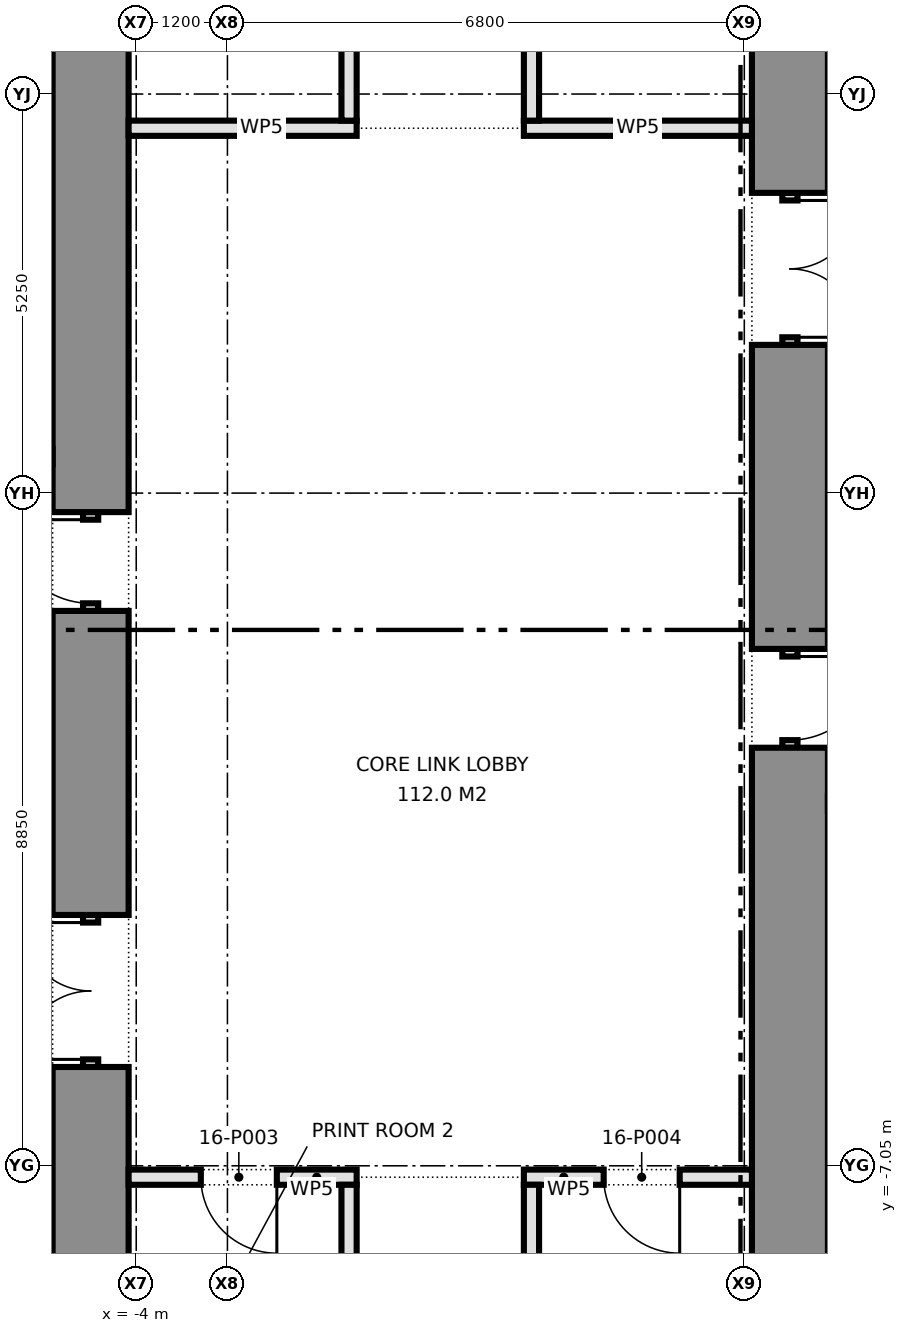
"""IFC4 building model, lengths in metres.
Left out: names, types, materials, properties, quantities, classifications, styles, units other than length and angle.
Written with IfcOpenShell. Run it as: python <this file> out.ifc"""

import sys

from ifc_helpers import new_model, si_unit, direction, frame, frame_2d, origin, place, context, subcontext, project, spatial, rectangle, extrude, element, fill, save


model = new_model("IFC4")
c1 = context("Model", 3, precision=1e-05, world=origin(), true_north=direction((0.0, 1.0)))
c2 = subcontext(c1, "Body", "Model", "MODEL_VIEW")
j1 = project(units=[si_unit("LENGTHUNIT", "METRE"), si_unit("PLANEANGLEUNIT", "RADIAN")], contexts=[c1])
p1 = place(None, origin())
s1 = spatial("IfcSite", under=j1, at=p1, CompositionType="ELEMENT")
p2 = place(p1, origin())
s2 = spatial("IfcBuilding", under=s1, at=p2, CompositionType="ELEMENT")
p3 = place(p2, frame((0.0, 0.0, 73.2)))
s3 = spatial("IfcBuildingStorey", under=s2, at=p3, CompositionType="ELEMENT", Elevation=73.2)
p4 = place(p3, frame((-4.6, -8.9, 0.0), z_axis=(0.0, 0.0, 1.0), x_axis=(0.0, 1.0, 0.0)))
e1 = element("IfcWall", 1, at=p4, inside=s3, PredefinedType="SHEAR", context=c2, shape_type="SweptSolid", body=[
    extrude(rectangle(XDim=3.15, YDim=1.0, at=frame_2d((1.575, 0.0))), origin(), (0.0, 0.0, 1.0), 4.2),
])
p5 = place(p3, frame((-4.6, -5.75, 0.0), z_axis=(0.0, 0.0, 1.0), x_axis=(0.0, 1.0, 0.0)))
e2 = element("IfcWall", 2, at=p5, inside=s3, PredefinedType="PARTITIONING", context=c2, shape_type="SweptSolid", body=[
    extrude(rectangle(XDim=2.0, YDim=0.2, at=frame_2d((1.0, 0.0))), origin(), (0.0, 0.0, 1.0), 2.4),
])
p6 = place(p5, frame((0.1, 0.0, 0.0)))
e3 = element("IfcOpeningElement", 3, at=p6, cuts=e2, PredefinedType="OPENING", context=c2, shape_type="SweptSolid", body=[
    extrude(rectangle(XDim=1.8, YDim=2.1, at=frame_2d((0.9, 1.05))), frame((0.0, 0.11, 0.0), z_axis=(0.0, -1.0, 0.0), x_axis=(1.0, 0.0, 0.0)), (0.0, 0.0, 1.0), 0.22),
])
p7 = place(p3, frame((-4.6, -3.75, 0.0), z_axis=(0.0, 0.0, 1.0), x_axis=(0.0, 1.0, 0.0)))
e4 = element("IfcWall", 4, at=p7, inside=s3, PredefinedType="SHEAR", context=c2, shape_type="SweptSolid", body=[
    extrude(rectangle(XDim=4.0, YDim=1.0, at=frame_2d((2.0, 0.0))), origin(), (0.0, 0.0, 1.0), 4.2),
])
p8 = place(p3, frame((-4.6, 0.25, 0.0), z_axis=(0.0, 0.0, 1.0), x_axis=(0.0, 1.0, 0.0)))
e5 = element("IfcWall", 5, at=p8, inside=s3, PredefinedType="PARTITIONING", context=c2, shape_type="SweptSolid", body=[
    extrude(rectangle(XDim=1.3, YDim=0.2, at=frame_2d((0.65, 0.0))), origin(), (0.0, 0.0, 1.0), 2.4),
])
p9 = place(p8, frame((0.1, 0.0, 0.0)))
e6 = element("IfcOpeningElement", 6, at=p9, cuts=e5, PredefinedType="OPENING", context=c2, shape_type="SweptSolid", body=[
    extrude(rectangle(XDim=1.1, YDim=2.1, at=frame_2d((0.55, 1.05))), frame((0.0, 0.11, 0.0), z_axis=(0.0, -1.0, 0.0), x_axis=(1.0, 0.0, 0.0)), (0.0, 0.0, 1.0), 0.22),
])
p10 = place(p3, frame((-4.6, 1.55, 0.0), z_axis=(0.0, 0.0, 1.0), x_axis=(0.0, 1.0, 0.0)))
e7 = element("IfcWall", 7, at=p10, inside=s3, PredefinedType="SHEAR", context=c2, shape_type="SweptSolid", body=[
    extrude(rectangle(XDim=7.35, YDim=1.0, at=frame_2d((3.675, 0.0))), origin(), (0.0, 0.0, 1.0), 4.2),
])
p11 = place(p3, frame((4.6, 8.9, 0.0), z_axis=(0.0, 0.0, 1.0), x_axis=(0.0, -1.0, 0.0)))
e8 = element("IfcWall", 8, at=p11, inside=s3, PredefinedType="SHEAR", context=c2, shape_type="SweptSolid", body=[
    extrude(rectangle(XDim=3.15, YDim=1.0, at=frame_2d((1.575, 0.0))), origin(), (0.0, 0.0, 1.0), 4.2),
])
p12 = place(p3, frame((4.6, 5.75, 0.0), z_axis=(0.0, 0.0, 1.0), x_axis=(0.0, -1.0, 0.0)))
e9 = element("IfcWall", 9, at=p12, inside=s3, PredefinedType="PARTITIONING", context=c2, shape_type="SweptSolid", body=[
    extrude(rectangle(XDim=2.0, YDim=0.2, at=frame_2d((1.0, 0.0))), origin(), (0.0, 0.0, 1.0), 2.4),
])
p13 = place(p12, frame((0.1, 0.0, 0.0)))
e10 = element("IfcOpeningElement", 10, at=p13, cuts=e9, PredefinedType="OPENING", context=c2, shape_type="SweptSolid", body=[
    extrude(rectangle(XDim=1.8, YDim=2.1, at=frame_2d((0.9, 1.05))), frame((0.0, 0.11, 0.0), z_axis=(0.0, -1.0, 0.0), x_axis=(1.0, 0.0, 0.0)), (0.0, 0.0, 1.0), 0.22),
])
p14 = place(p3, frame((4.6, 3.75, 0.0), z_axis=(0.0, 0.0, 1.0), x_axis=(0.0, -1.0, 0.0)))
e11 = element("IfcWall", 11, at=p14, inside=s3, PredefinedType="SHEAR", context=c2, shape_type="SweptSolid", body=[
    extrude(rectangle(XDim=4.0, YDim=1.0, at=frame_2d((2.0, 0.0))), origin(), (0.0, 0.0, 1.0), 4.2),
])
p15 = place(p3, frame((4.6, -0.25, 0.0), z_axis=(0.0, 0.0, 1.0), x_axis=(0.0, -1.0, 0.0)))
e12 = element("IfcWall", 12, at=p15, inside=s3, PredefinedType="PARTITIONING", context=c2, shape_type="SweptSolid", body=[
    extrude(rectangle(XDim=1.3, YDim=0.2, at=frame_2d((0.65, 0.0))), origin(), (0.0, 0.0, 1.0), 2.4),
])
p16 = place(p15, frame((0.1, 0.0, 0.0)))
e13 = element("IfcOpeningElement", 13, at=p16, cuts=e12, PredefinedType="OPENING", context=c2, shape_type="SweptSolid", body=[
    extrude(rectangle(XDim=1.1, YDim=2.1, at=frame_2d((0.55, 1.05))), frame((0.0, 0.11, 0.0), z_axis=(0.0, -1.0, 0.0), x_axis=(1.0, 0.0, 0.0)), (0.0, 0.0, 1.0), 0.22),
])
p17 = place(p3, frame((4.6, -1.55, 0.0), z_axis=(0.0, 0.0, 1.0), x_axis=(0.0, -1.0, 0.0)))
e14 = element("IfcWall", 14, at=p17, inside=s3, PredefinedType="SHEAR", context=c2, shape_type="SweptSolid", body=[
    extrude(rectangle(XDim=7.35, YDim=1.0, at=frame_2d((3.675, 0.0))), origin(), (0.0, 0.0, 1.0), 4.2),
])
p18 = place(p3, frame((-4.1, -7.2, 0.0), z_axis=(0.0, 0.0, 1.0), x_axis=(1.0, 0.0, 0.0)))
e15 = element("IfcWall", 15, at=p18, inside=s3, PredefinedType="PARTITIONING", context=c2, shape_type="SweptSolid", body=[
    extrude(rectangle(XDim=3.0, YDim=0.2, at=frame_2d((1.5, 0.0))), origin(), (0.0, 0.0, 1.0), 4.2),
])
p19 = place(p18, frame((0.95, 0.0, 0.0)))
e16 = element("IfcOpeningElement", 16, at=p19, cuts=e15, PredefinedType="OPENING", context=c2, shape_type="SweptSolid", body=[
    extrude(rectangle(XDim=1.0, YDim=2.1, at=frame_2d((0.5, 1.05))), frame((0.0, 0.11, 0.0), z_axis=(0.0, -1.0, 0.0), x_axis=(1.0, 0.0, 0.0)), (0.0, 0.0, 1.0), 0.22),
])
p20 = place(p3, frame((1.1, -7.2, 0.0), z_axis=(0.0, 0.0, 1.0), x_axis=(1.0, 0.0, 0.0)))
e17 = element("IfcWall", 17, at=p20, inside=s3, PredefinedType="PARTITIONING", context=c2, shape_type="SweptSolid", body=[
    extrude(rectangle(XDim=3.0, YDim=0.2, at=frame_2d((1.5, 0.0))), origin(), (0.0, 0.0, 1.0), 4.2),
])
p21 = place(p20, frame((1.05, 0.0, 0.0)))
e18 = element("IfcOpeningElement", 18, at=p21, cuts=e17, PredefinedType="OPENING", context=c2, shape_type="SweptSolid", body=[
    extrude(rectangle(XDim=1.0, YDim=2.1, at=frame_2d((0.5, 1.05))), frame((0.0, 0.11, 0.0), z_axis=(0.0, -1.0, 0.0), x_axis=(1.0, 0.0, 0.0)), (0.0, 0.0, 1.0), 0.22),
])
for number, where, z_axis, x_axis in (
    (19, (-4.1, 6.6, 0.0), (0.0, 0.0, 1.0), (1.0, 0.0, 0.0)),
    (20, (1.1, 6.6, 0.0), (0.0, 0.0, 1.0), (1.0, 0.0, 0.0)),
):
    element("IfcWall", number, at=place(p3, frame(where, z_axis=z_axis, x_axis=x_axis)), inside=s3, PredefinedType="PARTITIONING", context=c2, shape_type="SweptSolid", body=[
        extrude(rectangle(XDim=3.0, YDim=0.2, at=frame_2d((1.5, 0.0))), origin(), (0.0, 0.0, 1.0), 4.2),
    ])
p22 = place(p3, frame((1.2, -9.8, 0.0), z_axis=(0.0, 0.0, 1.0), x_axis=(0.0, 1.0, 0.0)))
e21 = element("IfcWall", 21, at=p22, inside=s3, PredefinedType="PARTITIONING", context=c2, shape_type="SweptSolid", body=[
    extrude(rectangle(XDim=2.5, YDim=0.2, at=frame_2d((1.25, 0.0))), origin(), (0.0, 0.0, 1.0), 4.2),
])
p23 = place(p3, frame((1.2, 6.7, 0.0), z_axis=(0.0, 0.0, 1.0), x_axis=(0.0, 1.0, 0.0)))
e22 = element("IfcWall", 22, at=p23, inside=s3, PredefinedType="PARTITIONING", context=c2, shape_type="SweptSolid", body=[
    extrude(rectangle(XDim=3.1, YDim=0.2, at=frame_2d((1.55, 0.0))), origin(), (0.0, 0.0, 1.0), 4.2),
])
p24 = place(p23, frame((1.05, 0.0, 0.0)))
e23 = element("IfcOpeningElement", 23, at=p24, cuts=e22, PredefinedType="OPENING", context=c2, shape_type="SweptSolid", body=[
    extrude(rectangle(XDim=1.0, YDim=2.1, at=frame_2d((0.5, 1.05))), frame((0.0, 0.11, 0.0), z_axis=(0.0, -1.0, 0.0), x_axis=(1.0, 0.0, 0.0)), (0.0, 0.0, 1.0), 0.22),
])
p25 = place(p3, frame((-1.2, -9.8, 0.0), z_axis=(0.0, 0.0, 1.0), x_axis=(0.0, 1.0, 0.0)))
e24 = element("IfcWall", 24, at=p25, inside=s3, PredefinedType="PARTITIONING", context=c2, shape_type="SweptSolid", body=[
    extrude(rectangle(XDim=2.5, YDim=0.2, at=frame_2d((1.25, 0.0))), origin(), (0.0, 0.0, 1.0), 4.2),
])
p26 = place(p3, frame((-1.2, 6.7, 0.0), z_axis=(0.0, 0.0, 1.0), x_axis=(0.0, 1.0, 0.0)))
e25 = element("IfcWall", 25, at=p26, inside=s3, PredefinedType="PARTITIONING", context=c2, shape_type="SweptSolid", body=[
    extrude(rectangle(XDim=3.1, YDim=0.2, at=frame_2d((1.55, 0.0))), origin(), (0.0, 0.0, 1.0), 4.2),
])
p27 = place(p26, frame((1.05, 0.0, 0.0)))
e26 = element("IfcOpeningElement", 26, at=p27, cuts=e25, PredefinedType="OPENING", context=c2, shape_type="SweptSolid", body=[
    extrude(rectangle(XDim=1.0, YDim=2.1, at=frame_2d((0.5, 1.05))), frame((0.0, 0.11, 0.0), z_axis=(0.0, -1.0, 0.0), x_axis=(1.0, 0.0, 0.0)), (0.0, 0.0, 1.0), 0.22),
])
p28 = place(p6, origin())
e27 = element("IfcDoor", 27, at=p28, inside=s3, OperationType="DOUBLE_DOOR_SINGLE_SWING", PredefinedType="DOOR", context=c2, shape_type="SweptSolid", body=[
    extrude(rectangle(XDim=1.8, YDim=2.1, at=frame_2d((0.9, 1.05))), frame((0.0, 0.025, 0.0), z_axis=(0.0, -1.0, 0.0), x_axis=(1.0, 0.0, 0.0)), (0.0, 0.0, 1.0), 0.05),
])
fill(e3, e27)
p29 = place(p9, origin())
e28 = element("IfcDoor", 28, at=p29, inside=s3, OperationType="SINGLE_SWING_RIGHT", PredefinedType="DOOR", context=c2, shape_type="SweptSolid", body=[
    extrude(rectangle(XDim=1.1, YDim=2.1, at=frame_2d((0.55, 1.05))), frame((0.0, 0.025, 0.0), z_axis=(0.0, -1.0, 0.0), x_axis=(1.0, 0.0, 0.0)), (0.0, 0.0, 1.0), 0.05),
])
fill(e6, e28)
p30 = place(p13, origin())
e29 = element("IfcDoor", 29, at=p30, inside=s3, OperationType="DOUBLE_DOOR_SINGLE_SWING", PredefinedType="DOOR", context=c2, shape_type="SweptSolid", body=[
    extrude(rectangle(XDim=1.8, YDim=2.1, at=frame_2d((0.9, 1.05))), frame((0.0, 0.025, 0.0), z_axis=(0.0, -1.0, 0.0), x_axis=(1.0, 0.0, 0.0)), (0.0, 0.0, 1.0), 0.05),
])
fill(e10, e29)
p31 = place(p16, origin())
e30 = element("IfcDoor", 30, at=p31, inside=s3, OperationType="SINGLE_SWING_LEFT", PredefinedType="DOOR", context=c2, shape_type="SweptSolid", body=[
    extrude(rectangle(XDim=1.1, YDim=2.1, at=frame_2d((0.55, 1.05))), frame((0.0, 0.025, 0.0), z_axis=(0.0, -1.0, 0.0), x_axis=(1.0, 0.0, 0.0)), (0.0, 0.0, 1.0), 0.05),
])
fill(e13, e30)
p32 = place(p19, frame((1.0, 0.0, 0.0), z_axis=(0.0, 0.0, 1.0), x_axis=(-1.0, 0.0, 0.0)))
e31 = element("IfcDoor", 31, at=p32, inside=s3, OperationType="SINGLE_SWING_LEFT", PredefinedType="DOOR", context=c2, shape_type="SweptSolid", body=[
    extrude(rectangle(XDim=1.0, YDim=2.1, at=frame_2d((0.5, 1.05))), frame((0.0, 0.025, 0.0), z_axis=(0.0, -1.0, 0.0), x_axis=(1.0, 0.0, 0.0)), (0.0, 0.0, 1.0), 0.05),
])
fill(e16, e31)
p33 = place(p21, frame((1.0, 0.0, 0.0), z_axis=(0.0, 0.0, 1.0), x_axis=(-1.0, 0.0, 0.0)))
e32 = element("IfcDoor", 32, at=p33, inside=s3, OperationType="SINGLE_SWING_LEFT", PredefinedType="DOOR", context=c2, shape_type="SweptSolid", body=[
    extrude(rectangle(XDim=1.0, YDim=2.1, at=frame_2d((0.5, 1.05))), frame((0.0, 0.025, 0.0), z_axis=(0.0, -1.0, 0.0), x_axis=(1.0, 0.0, 0.0)), (0.0, 0.0, 1.0), 0.05),
])
fill(e18, e32)
save(model, sys.argv[1])
